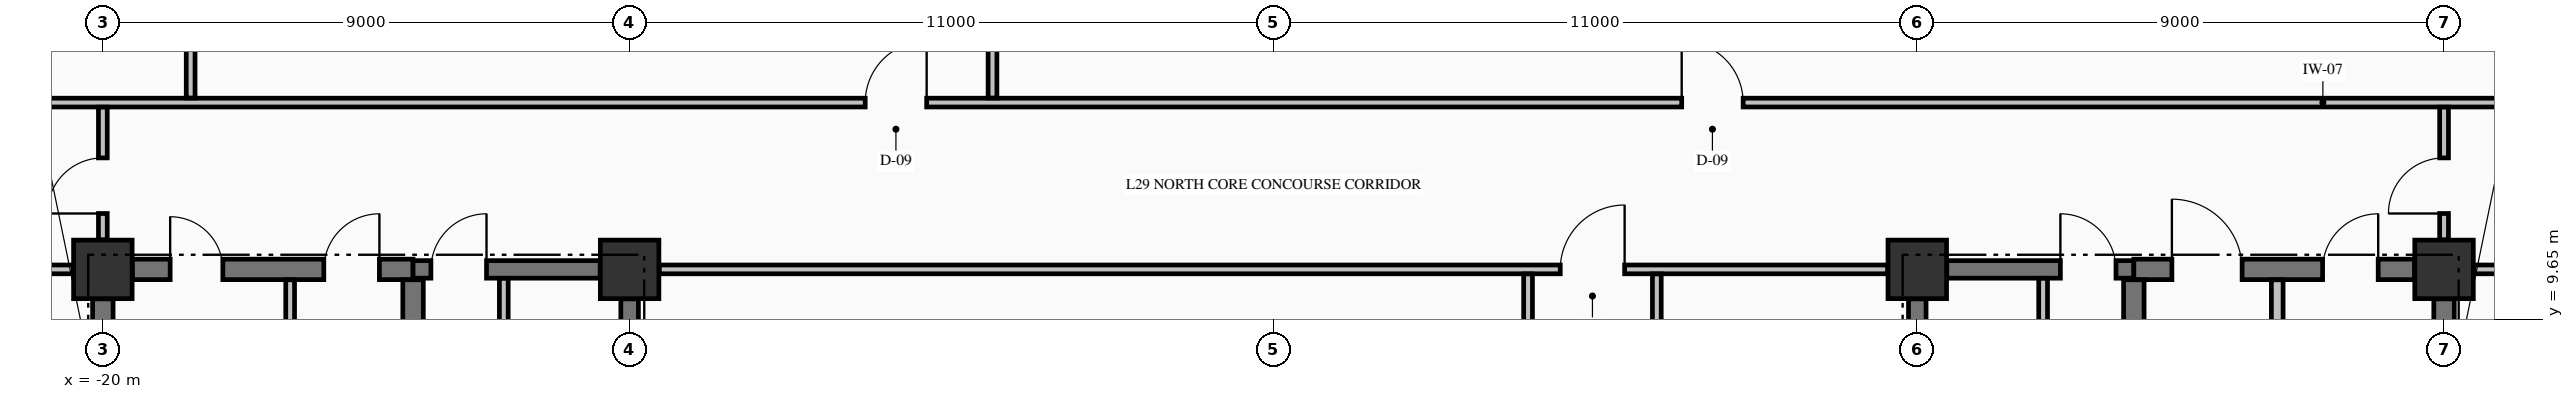
"""IFC4 building model, lengths in metres.
Left out: names, types, materials, properties, quantities, classifications, styles, units other than length and angle.
Written with IfcOpenShell. Run it as: python <this file> out.ifc"""

import sys

from ifc_helpers import new_model, si_unit, direction, frame, frame_2d, origin, origin_2d, place, context, subcontext, project, spatial, rectangle, extrude, element, fill, save


model = new_model("IFC4")
c1 = context("Model", 3, precision=1e-05, world=origin(), true_north=direction((0.0, 1.0)))
c2 = subcontext(c1, "Body", "Model", "MODEL_VIEW")
j1 = project(units=[si_unit("LENGTHUNIT", "METRE"), si_unit("PLANEANGLEUNIT", "RADIAN")], contexts=[c1])
p1 = place(None, origin())
s1 = spatial("IfcSite", under=j1, at=p1, CompositionType="ELEMENT")
p2 = place(p1, origin())
s2 = spatial("IfcBuilding", under=s1, at=p2, CompositionType="ELEMENT")
p3 = place(p2, frame((0.0, 0.0, 116.35)))
s3 = spatial("IfcBuildingStorey", under=s2, at=p3, CompositionType="ELEMENT", Elevation=116.35)
for number, where, z_axis, x_axis in (
    (1, (-20.0, 10.5, -0.425), (0.0, 0.0, 1.0), (1.0, 0.0, 0.0)),
    (2, (-11.0, 10.5, -0.425), (0.0, 0.0, 1.0), (1.0, 0.0, 0.0)),
    (3, (11.0, 10.5, -0.425), (0.0, 0.0, 1.0), (1.0, 0.0, 0.0)),
    (4, (20.0, 10.5, -0.425), (0.0, 0.0, 1.0), (1.0, 0.0, 0.0)),
):
    element("IfcColumn", number, at=place(p3, frame(where, z_axis=z_axis, x_axis=x_axis)), inside=s3, PredefinedType="COLUMN", context=c2, shape_type="SweptSolid", body=[
        extrude(rectangle(XDim=1.0, YDim=1.0, at=origin_2d()), origin(), (0.0, 0.0, 1.0), 5.0),
    ])
p4 = place(p3, frame((-19.496, 10.5, 0.0), z_axis=(0.0, 0.0, 1.0), x_axis=(1.0, 0.0, 0.0)))
e5 = element("IfcWall", 5, at=p4, inside=s3, PredefinedType="SHEAR", context=c2, shape_type="SweptSolid", body=[
    extrude(rectangle(XDim=4.796, YDim=0.35, at=frame_2d((2.398, 0.0))), origin(), (0.0, 0.0, 1.0), 4.575),
])
p5 = place(p4, frame((0.646, 0.0, 0.0)))
e6 = element("IfcOpeningElement", 6, at=p5, cuts=e5, PredefinedType="OPENING", context=c2, shape_type="SweptSolid", body=[
    extrude(rectangle(XDim=0.9, YDim=2.15, at=frame_2d((0.45, 1.075))), frame((0.0, 0.185, 0.0), z_axis=(0.0, -1.0, 0.0), x_axis=(1.0, 0.0, 0.0)), (0.0, 0.0, 1.0), 0.37),
])
p6 = place(p4, frame((3.271, 0.0, 0.0)))
e7 = element("IfcOpeningElement", 7, at=p6, cuts=e5, PredefinedType="OPENING", context=c2, shape_type="SweptSolid", body=[
    extrude(rectangle(XDim=0.95, YDim=2.15, at=frame_2d((0.475, 1.075))), frame((0.0, 0.185, 0.0), z_axis=(0.0, -1.0, 0.0), x_axis=(1.0, 0.0, 0.0)), (0.0, 0.0, 1.0), 0.37),
])
p7 = place(p3, frame((-14.7, 10.5, 0.0), z_axis=(0.0, 0.0, 1.0), x_axis=(1.0, 0.0, 0.0)))
e8 = element("IfcWall", 8, at=p7, inside=s3, PredefinedType="SHEAR", context=c2, shape_type="SweptSolid", body=[
    extrude(rectangle(XDim=3.196, YDim=0.3, at=frame_2d((1.598, 0.0))), origin(), (0.0, 0.0, 1.0), 4.575),
])
p8 = place(p7, frame((0.305, 0.0, 0.0)))
e9 = element("IfcOpeningElement", 9, at=p8, cuts=e8, PredefinedType="OPENING", context=c2, shape_type="SweptSolid", body=[
    extrude(rectangle(XDim=0.95, YDim=2.15, at=frame_2d((0.475, 1.075))), frame((0.0, 0.16, 0.0), z_axis=(0.0, -1.0, 0.0), x_axis=(1.0, 0.0, 0.0)), (0.0, 0.0, 1.0), 0.32),
])
p9 = place(p3, frame((11.504, 10.5, 0.0), z_axis=(0.0, 0.0, 1.0), x_axis=(1.0, 0.0, 0.0)))
e10 = element("IfcWall", 10, at=p9, inside=s3, PredefinedType="SHEAR", context=c2, shape_type="SweptSolid", body=[
    extrude(rectangle(XDim=3.196, YDim=0.3, at=frame_2d((1.598, 0.0))), origin(), (0.0, 0.0, 1.0), 4.575),
])
p10 = place(p9, frame((1.941, 0.0, 0.0)))
e11 = element("IfcOpeningElement", 11, at=p10, cuts=e10, PredefinedType="OPENING", context=c2, shape_type="SweptSolid", body=[
    extrude(rectangle(XDim=0.95, YDim=2.15, at=frame_2d((0.475, 1.075))), frame((0.0, 0.16, 0.0), z_axis=(0.0, -1.0, 0.0), x_axis=(1.0, 0.0, 0.0)), (0.0, 0.0, 1.0), 0.32),
])
p11 = place(p3, frame((14.7, 10.5, 0.0), z_axis=(0.0, 0.0, 1.0), x_axis=(1.0, 0.0, 0.0)))
e12 = element("IfcWall", 12, at=p11, inside=s3, PredefinedType="SHEAR", context=c2, shape_type="SweptSolid", body=[
    extrude(rectangle(XDim=4.796, YDim=0.35, at=frame_2d((2.398, 0.0))), origin(), (0.0, 0.0, 1.0), 4.575),
])
p12 = place(p11, frame((0.65, 0.0, 0.0)))
e13 = element("IfcOpeningElement", 13, at=p12, cuts=e12, PredefinedType="OPENING", context=c2, shape_type="SweptSolid", body=[
    extrude(rectangle(XDim=1.2, YDim=2.15, at=frame_2d((0.6, 1.075))), frame((0.0, 0.185, 0.0), z_axis=(0.0, -1.0, 0.0), x_axis=(1.0, 0.0, 0.0)), (0.0, 0.0, 1.0), 0.37),
])
p13 = place(p11, frame((3.225, 0.0, 0.0)))
e14 = element("IfcOpeningElement", 14, at=p13, cuts=e12, PredefinedType="OPENING", context=c2, shape_type="SweptSolid", body=[
    extrude(rectangle(XDim=0.95, YDim=2.15, at=frame_2d((0.475, 1.075))), frame((0.0, 0.185, 0.0), z_axis=(0.0, -1.0, 0.0), x_axis=(1.0, 0.0, 0.0)), (0.0, 0.0, 1.0), 0.37),
])
p14 = place(p3, frame((-22.835, 10.5, 0.0), z_axis=(0.0, 0.0, 1.0), x_axis=(1.0, 0.0, 0.0)))
e15 = element("IfcWall", 15, at=p14, inside=s3, PredefinedType="PARTITIONING", context=c2, shape_type="SweptSolid", body=[
    extrude(rectangle(XDim=2.329, YDim=0.15, at=frame_2d((1.165, 0.0))), origin(), (0.0, 0.0, 1.0), 4.575),
])
p15 = place(p14, frame((0.835, 0.0, 0.0)))
e16 = element("IfcOpeningElement", 16, at=p15, cuts=e15, PredefinedType="OPENING", context=c2, shape_type="SweptSolid", body=[
    extrude(rectangle(XDim=1.0, YDim=2.15, at=frame_2d((0.5, 1.075))), frame((0.0, 0.085, 0.0), z_axis=(0.0, -1.0, 0.0), x_axis=(1.0, 0.0, 0.0)), (0.0, 0.0, 1.0), 0.17),
])
p16 = place(p3, frame((-10.494, 10.5, 0.0), z_axis=(0.0, 0.0, 1.0), x_axis=(1.0, 0.0, 0.0)))
e17 = element("IfcWall", 17, at=p16, inside=s3, PredefinedType="PARTITIONING", context=c2, shape_type="SweptSolid", body=[
    extrude(rectangle(XDim=20.988, YDim=0.15, at=frame_2d((10.494, 0.0))), origin(), (0.0, 0.0, 1.0), 4.575),
])
p17 = place(p16, frame((15.394, 0.0, 0.0)))
e18 = element("IfcOpeningElement", 18, at=p17, cuts=e17, PredefinedType="OPENING", context=c2, shape_type="SweptSolid", body=[
    extrude(rectangle(XDim=1.1, YDim=2.15, at=frame_2d((0.55, 1.075))), frame((0.0, 0.085, 0.0), z_axis=(0.0, -1.0, 0.0), x_axis=(1.0, 0.0, 0.0)), (0.0, 0.0, 1.0), 0.17),
])
p18 = place(p3, frame((20.506, 10.5, 0.0), z_axis=(0.0, 0.0, 1.0), x_axis=(1.0, 0.0, 0.0)))
e19 = element("IfcWall", 19, at=p18, inside=s3, PredefinedType="PARTITIONING", context=c2, shape_type="SweptSolid", body=[
    extrude(rectangle(XDim=7.329, YDim=0.15, at=frame_2d((3.665, 0.0))), origin(), (0.0, 0.0, 1.0), 4.575),
])
p19 = place(p18, frame((3.019, 0.0, 0.0)))
e20 = element("IfcOpeningElement", 20, at=p19, cuts=e19, PredefinedType="OPENING", context=c2, shape_type="SweptSolid", body=[
    extrude(rectangle(XDim=0.95, YDim=2.02, at=frame_2d((0.475, 1.01))), frame((0.0, 0.085, 0.0), z_axis=(0.0, -1.0, 0.0), x_axis=(1.0, 0.0, 0.0)), (0.0, 0.0, 1.0), 0.17),
])
p20 = place(p3, frame((-22.835, 13.35, 0.0), z_axis=(0.0, 0.0, 1.0), x_axis=(1.0, 0.0, 0.0)))
e21 = element("IfcWall", 21, at=p20, inside=s3, PredefinedType="PARTITIONING", context=c2, shape_type="SweptSolid", body=[
    extrude(rectangle(XDim=50.67, YDim=0.15, at=frame_2d((25.335, 0.0))), origin(), (0.0, 0.0, 1.0), 4.575),
])
p21 = place(p20, frame((15.86, 0.0, 0.0)))
e22 = element("IfcOpeningElement", 22, at=p21, cuts=e21, PredefinedType="OPENING", context=c2, shape_type="SweptSolid", body=[
    extrude(rectangle(XDim=1.05, YDim=2.15, at=frame_2d((0.525, 1.075))), frame((0.0, 0.085, 0.0), z_axis=(0.0, -1.0, 0.0), x_axis=(1.0, 0.0, 0.0)), (0.0, 0.0, 1.0), 0.17),
])
p22 = place(p20, frame((29.81, 0.0, 0.0)))
e23 = element("IfcOpeningElement", 23, at=p22, cuts=e21, PredefinedType="OPENING", context=c2, shape_type="SweptSolid", body=[
    extrude(rectangle(XDim=1.05, YDim=2.15, at=frame_2d((0.525, 1.075))), frame((0.0, 0.085, 0.0), z_axis=(0.0, -1.0, 0.0), x_axis=(1.0, 0.0, 0.0)), (0.0, 0.0, 1.0), 0.17),
])
p23 = place(p3, frame((-20.0, 0.504, 0.0), z_axis=(0.0, 0.0, 1.0), x_axis=(0.0, 1.0, 0.0)))
e24 = element("IfcWall", 24, at=p23, inside=s3, PredefinedType="SHEAR", context=c2, shape_type="SweptSolid", body=[
    extrude(rectangle(XDim=9.492, YDim=0.35, at=frame_2d((4.746, 0.0))), origin(), (0.0, 0.0, 1.0), 4.575),
])
p24 = place(p3, frame((-14.7, 5.852, 0.0), z_axis=(0.0, 0.0, 1.0), x_axis=(0.0, 1.0, 0.0)))
e25 = element("IfcWall", 25, at=p24, inside=s3, PredefinedType="SHEAR", context=c2, shape_type="SweptSolid", body=[
    extrude(rectangle(XDim=4.471, YDim=0.35, at=frame_2d((2.235, 0.0))), origin(), (0.0, 0.0, 1.0), 4.575),
])
for number, where, z_axis, x_axis in (
    (26, (-11.0, 5.852, 0.0), (0.0, 0.0, 1.0), (0.0, 1.0, 0.0)),
    (27, (11.0, 5.852, 0.0), (0.0, 0.0, 1.0), (0.0, 1.0, 0.0)),
):
    element("IfcWall", number, at=place(p3, frame(where, z_axis=z_axis, x_axis=x_axis)), inside=s3, PredefinedType="SHEAR", context=c2, shape_type="SweptSolid", body=[
        extrude(rectangle(XDim=4.144, YDim=0.3, at=frame_2d((2.072, 0.0))), origin(), (0.0, 0.0, 1.0), 4.575),
    ])
p25 = place(p3, frame((14.7, 5.852, 0.0), z_axis=(0.0, 0.0, 1.0), x_axis=(0.0, 1.0, 0.0)))
e28 = element("IfcWall", 28, at=p25, inside=s3, PredefinedType="SHEAR", context=c2, shape_type="SweptSolid", body=[
    extrude(rectangle(XDim=4.471, YDim=0.35, at=frame_2d((2.235, 0.0))), origin(), (0.0, 0.0, 1.0), 4.575),
])
p26 = place(p3, frame((20.0, 5.377, 0.0), z_axis=(0.0, 0.0, 1.0), x_axis=(0.0, 1.0, 0.0)))
e29 = element("IfcWall", 29, at=p26, inside=s3, PredefinedType="SHEAR", context=c2, shape_type="SweptSolid", body=[
    extrude(rectangle(XDim=4.619, YDim=0.35, at=frame_2d((2.31, 0.0))), origin(), (0.0, 0.0, 1.0), 4.575),
])
p27 = place(p3, frame((-20.0, 11.006, 0.0), z_axis=(0.0, 0.0, 1.0), x_axis=(0.0, 1.0, 0.0)))
e30 = element("IfcWall", 30, at=p27, inside=s3, PredefinedType="PARTITIONING", context=c2, shape_type="SweptSolid", body=[
    extrude(rectangle(XDim=2.266, YDim=0.15, at=frame_2d((1.133, 0.0))), origin(), (0.0, 0.0, 1.0), 4.065),
])
p28 = place(p27, frame((0.449, 0.0, 0.0)))
e31 = element("IfcOpeningElement", 31, at=p28, cuts=e30, PredefinedType="OPENING", context=c2, shape_type="SweptSolid", body=[
    extrude(rectangle(XDim=0.95, YDim=2.02, at=frame_2d((0.475, 1.01))), frame((0.0, 0.085, 0.0), z_axis=(0.0, -1.0, 0.0), x_axis=(1.0, 0.0, 0.0)), (0.0, 0.0, 1.0), 0.17),
])
p29 = place(p3, frame((-18.5, 13.428, 0.0), z_axis=(0.0, 0.0, 1.0), x_axis=(0.0, 1.0, 0.0)))
e32 = element("IfcWall", 32, at=p29, inside=s3, PredefinedType="PARTITIONING", context=c2, shape_type="SweptSolid", body=[
    extrude(rectangle(XDim=6.966, YDim=0.15, at=frame_2d((3.483, 0.0))), origin(), (0.0, 0.0, 1.0), 4.575),
])
p30 = place(p3, frame((-16.8, 4.878, 0.0), z_axis=(0.0, 0.0, 1.0), x_axis=(0.0, 1.0, 0.0)))
e33 = element("IfcWall", 33, at=p30, inside=s3, PredefinedType="PARTITIONING", context=c2, shape_type="SweptSolid", body=[
    extrude(rectangle(XDim=5.444, YDim=0.15, at=frame_2d((2.722, 0.0))), origin(), (0.0, 0.0, 1.0), 4.575),
])
p31 = place(p3, frame((-13.15, 7.228, 0.0), z_axis=(0.0, 0.0, 1.0), x_axis=(0.0, 1.0, 0.0)))
e34 = element("IfcWall", 34, at=p31, inside=s3, PredefinedType="PARTITIONING", context=c2, shape_type="SweptSolid", body=[
    extrude(rectangle(XDim=3.119, YDim=0.15, at=frame_2d((1.56, 0.0))), origin(), (0.0, 0.0, 1.0), 4.575),
])
p32 = place(p31, frame((1.097, 0.0, 0.0)))
e35 = element("IfcOpeningElement", 35, at=p32, cuts=e34, PredefinedType="OPENING", context=c2, shape_type="SweptSolid", body=[
    extrude(rectangle(XDim=0.95, YDim=2.15, at=frame_2d((0.475, 1.075))), frame((0.0, 0.085, 0.0), z_axis=(0.0, -1.0, 0.0), x_axis=(1.0, 0.0, 0.0)), (0.0, 0.0, 1.0), 0.17),
])
p33 = place(p3, frame((-4.8, 13.428, 0.0), z_axis=(0.0, 0.0, 1.0), x_axis=(0.0, 1.0, 0.0)))
e36 = element("IfcWall", 36, at=p33, inside=s3, PredefinedType="PARTITIONING", context=c2, shape_type="SweptSolid", body=[
    extrude(rectangle(XDim=11.907, YDim=0.15, at=frame_2d((5.954, 0.0))), origin(), (0.0, 0.0, 1.0), 4.575),
])
for number, where, z_axis, x_axis in (
    (37, (4.35, 2.978, 0.0), (0.0, 0.0, 1.0), (0.0, 1.0, 0.0)),
    (38, (6.55, 2.978, 0.0), (0.0, 0.0, 1.0), (0.0, 1.0, 0.0)),
):
    element("IfcWall", number, at=place(p3, frame(where, z_axis=z_axis, x_axis=x_axis)), inside=s3, PredefinedType="PARTITIONING", context=c2, shape_type="SweptSolid", body=[
        extrude(rectangle(XDim=7.444, YDim=0.15, at=frame_2d((3.722, 0.0))), origin(), (0.0, 0.0, 1.0), 4.575),
    ])
p34 = place(p3, frame((13.15, 7.228, 0.0), z_axis=(0.0, 0.0, 1.0), x_axis=(0.0, 1.0, 0.0)))
e39 = element("IfcWall", 39, at=p34, inside=s3, PredefinedType="PARTITIONING", context=c2, shape_type="SweptSolid", body=[
    extrude(rectangle(XDim=3.119, YDim=0.15, at=frame_2d((1.56, 0.0))), origin(), (0.0, 0.0, 1.0), 4.575),
])
p35 = place(p34, frame((1.097, 0.0, 0.0)))
e40 = element("IfcOpeningElement", 40, at=p35, cuts=e39, PredefinedType="OPENING", context=c2, shape_type="SweptSolid", body=[
    extrude(rectangle(XDim=0.95, YDim=2.15, at=frame_2d((0.475, 1.075))), frame((0.0, 0.085, 0.0), z_axis=(0.0, -1.0, 0.0), x_axis=(1.0, 0.0, 0.0)), (0.0, 0.0, 1.0), 0.17),
])
p36 = place(p3, frame((17.15, 7.928, 0.0), z_axis=(0.0, 0.0, 1.0), x_axis=(0.0, 1.0, 0.0)))
e41 = element("IfcWall", 41, at=p36, inside=s3, PredefinedType="PARTITIONING", context=c2, shape_type="SweptSolid", body=[
    extrude(rectangle(XDim=2.394, YDim=0.2, at=frame_2d((1.197, 0.0))), origin(), (0.0, 0.0, 1.0), 4.575),
])
p37 = place(p3, frame((20.0, 11.006, 0.0), z_axis=(0.0, 0.0, 1.0), x_axis=(0.0, 1.0, 0.0)))
e42 = element("IfcWall", 42, at=p37, inside=s3, PredefinedType="PARTITIONING", context=c2, shape_type="SweptSolid", body=[
    extrude(rectangle(XDim=2.266, YDim=0.15, at=frame_2d((1.133, 0.0))), origin(), (0.0, 0.0, 1.0), 4.03),
])
p38 = place(p37, frame((0.449, 0.0, 0.0)))
e43 = element("IfcOpeningElement", 43, at=p38, cuts=e42, PredefinedType="OPENING", context=c2, shape_type="SweptSolid", body=[
    extrude(rectangle(XDim=0.95, YDim=2.02, at=frame_2d((0.475, 1.01))), frame((0.0, 0.085, 0.0), z_axis=(0.0, -1.0, 0.0), x_axis=(1.0, 0.0, 0.0)), (0.0, 0.0, 1.0), 0.17),
])
p39 = place(p8, origin())
e44 = element("IfcDoor", 44, at=p39, inside=s3, OperationType="SINGLE_SWING_RIGHT", PredefinedType="DOOR", context=c2, shape_type="SweptSolid", body=[
    extrude(rectangle(XDim=0.95, YDim=2.15, at=frame_2d((0.475, 1.075))), frame((0.0, 0.025, 0.0), z_axis=(0.0, -1.0, 0.0), x_axis=(1.0, 0.0, 0.0)), (0.0, 0.0, 1.0), 0.05),
])
fill(e9, e44)
p40 = place(p10, origin())
e45 = element("IfcDoor", 45, at=p40, inside=s3, OperationType="SINGLE_SWING_LEFT", PredefinedType="DOOR", context=c2, shape_type="SweptSolid", body=[
    extrude(rectangle(XDim=0.95, YDim=2.15, at=frame_2d((0.475, 1.075))), frame((0.0, 0.025, 0.0), z_axis=(0.0, -1.0, 0.0), x_axis=(1.0, 0.0, 0.0)), (0.0, 0.0, 1.0), 0.05),
])
fill(e11, e45)
p41 = place(p5, origin())
e46 = element("IfcDoor", 46, at=p41, inside=s3, OperationType="SINGLE_SWING_LEFT", PredefinedType="DOOR", context=c2, shape_type="SweptSolid", body=[
    extrude(rectangle(XDim=0.9, YDim=2.15, at=frame_2d((0.45, 1.075))), frame((0.0, 0.025, 0.0), z_axis=(0.0, -1.0, 0.0), x_axis=(1.0, 0.0, 0.0)), (0.0, 0.0, 1.0), 0.05),
])
fill(e6, e46)
p42 = place(p6, origin())
e47 = element("IfcDoor", 47, at=p42, inside=s3, OperationType="SINGLE_SWING_RIGHT", PredefinedType="DOOR", context=c2, shape_type="SweptSolid", body=[
    extrude(rectangle(XDim=0.95, YDim=2.15, at=frame_2d((0.475, 1.075))), frame((0.0, 0.025, 0.0), z_axis=(0.0, -1.0, 0.0), x_axis=(1.0, 0.0, 0.0)), (0.0, 0.0, 1.0), 0.05),
])
fill(e7, e47)
p43 = place(p12, origin())
e48 = element("IfcDoor", 48, at=p43, inside=s3, OperationType="SINGLE_SWING_LEFT", PredefinedType="DOOR", context=c2, shape_type="SweptSolid", body=[
    extrude(rectangle(XDim=1.2, YDim=2.15, at=frame_2d((0.6, 1.075))), frame((0.0, 0.025, 0.0), z_axis=(0.0, -1.0, 0.0), x_axis=(1.0, 0.0, 0.0)), (0.0, 0.0, 1.0), 0.05),
])
fill(e13, e48)
p44 = place(p13, origin())
e49 = element("IfcDoor", 49, at=p44, inside=s3, OperationType="SINGLE_SWING_RIGHT", PredefinedType="DOOR", context=c2, shape_type="SweptSolid", body=[
    extrude(rectangle(XDim=0.95, YDim=2.15, at=frame_2d((0.475, 1.075))), frame((0.0, 0.025, 0.0), z_axis=(0.0, -1.0, 0.0), x_axis=(1.0, 0.0, 0.0)), (0.0, 0.0, 1.0), 0.05),
])
fill(e14, e49)
p45 = place(p17, origin())
e50 = element("IfcDoor", 50, at=p45, inside=s3, OperationType="SINGLE_SWING_RIGHT", PredefinedType="DOOR", context=c2, shape_type="SweptSolid", body=[
    extrude(rectangle(XDim=1.1, YDim=2.15, at=frame_2d((0.55, 1.075))), frame((0.0, 0.025, 0.0), z_axis=(0.0, -1.0, 0.0), x_axis=(1.0, 0.0, 0.0)), (0.0, 0.0, 1.0), 0.05),
])
fill(e18, e50)
p46 = place(p21, origin())
e51 = element("IfcDoor", 51, at=p46, inside=s3, OperationType="SINGLE_SWING_RIGHT", PredefinedType="DOOR", context=c2, shape_type="SweptSolid", body=[
    extrude(rectangle(XDim=1.05, YDim=2.15, at=frame_2d((0.525, 1.075))), frame((0.0, 0.025, 0.0), z_axis=(0.0, -1.0, 0.0), x_axis=(1.0, 0.0, 0.0)), (0.0, 0.0, 1.0), 0.05),
])
fill(e22, e51)
p47 = place(p22, origin())
e52 = element("IfcDoor", 52, at=p47, inside=s3, OperationType="SINGLE_SWING_LEFT", PredefinedType="DOOR", context=c2, shape_type="SweptSolid", body=[
    extrude(rectangle(XDim=1.05, YDim=2.15, at=frame_2d((0.525, 1.075))), frame((0.0, 0.025, 0.0), z_axis=(0.0, -1.0, 0.0), x_axis=(1.0, 0.0, 0.0)), (0.0, 0.0, 1.0), 0.05),
])
fill(e23, e52)
p48 = place(p28, origin())
e53 = element("IfcDoor", 53, at=p48, inside=s3, OperationType="SINGLE_SWING_LEFT", PredefinedType="DOOR", context=c2, shape_type="SweptSolid", body=[
    extrude(rectangle(XDim=0.95, YDim=2.02, at=frame_2d((0.475, 1.01))), frame((0.0, 0.025, 0.0), z_axis=(0.0, -1.0, 0.0), x_axis=(1.0, 0.0, 0.0)), (0.0, 0.0, 1.0), 0.05),
])
fill(e31, e53)
p49 = place(p38, origin())
e54 = element("IfcDoor", 54, at=p49, inside=s3, OperationType="SINGLE_SWING_LEFT", PredefinedType="DOOR", context=c2, shape_type="SweptSolid", body=[
    extrude(rectangle(XDim=0.95, YDim=2.02, at=frame_2d((0.475, 1.01))), frame((0.0, 0.025, 0.0), z_axis=(0.0, -1.0, 0.0), x_axis=(1.0, 0.0, 0.0)), (0.0, 0.0, 1.0), 0.05),
])
fill(e43, e54)
save(model, sys.argv[1])
